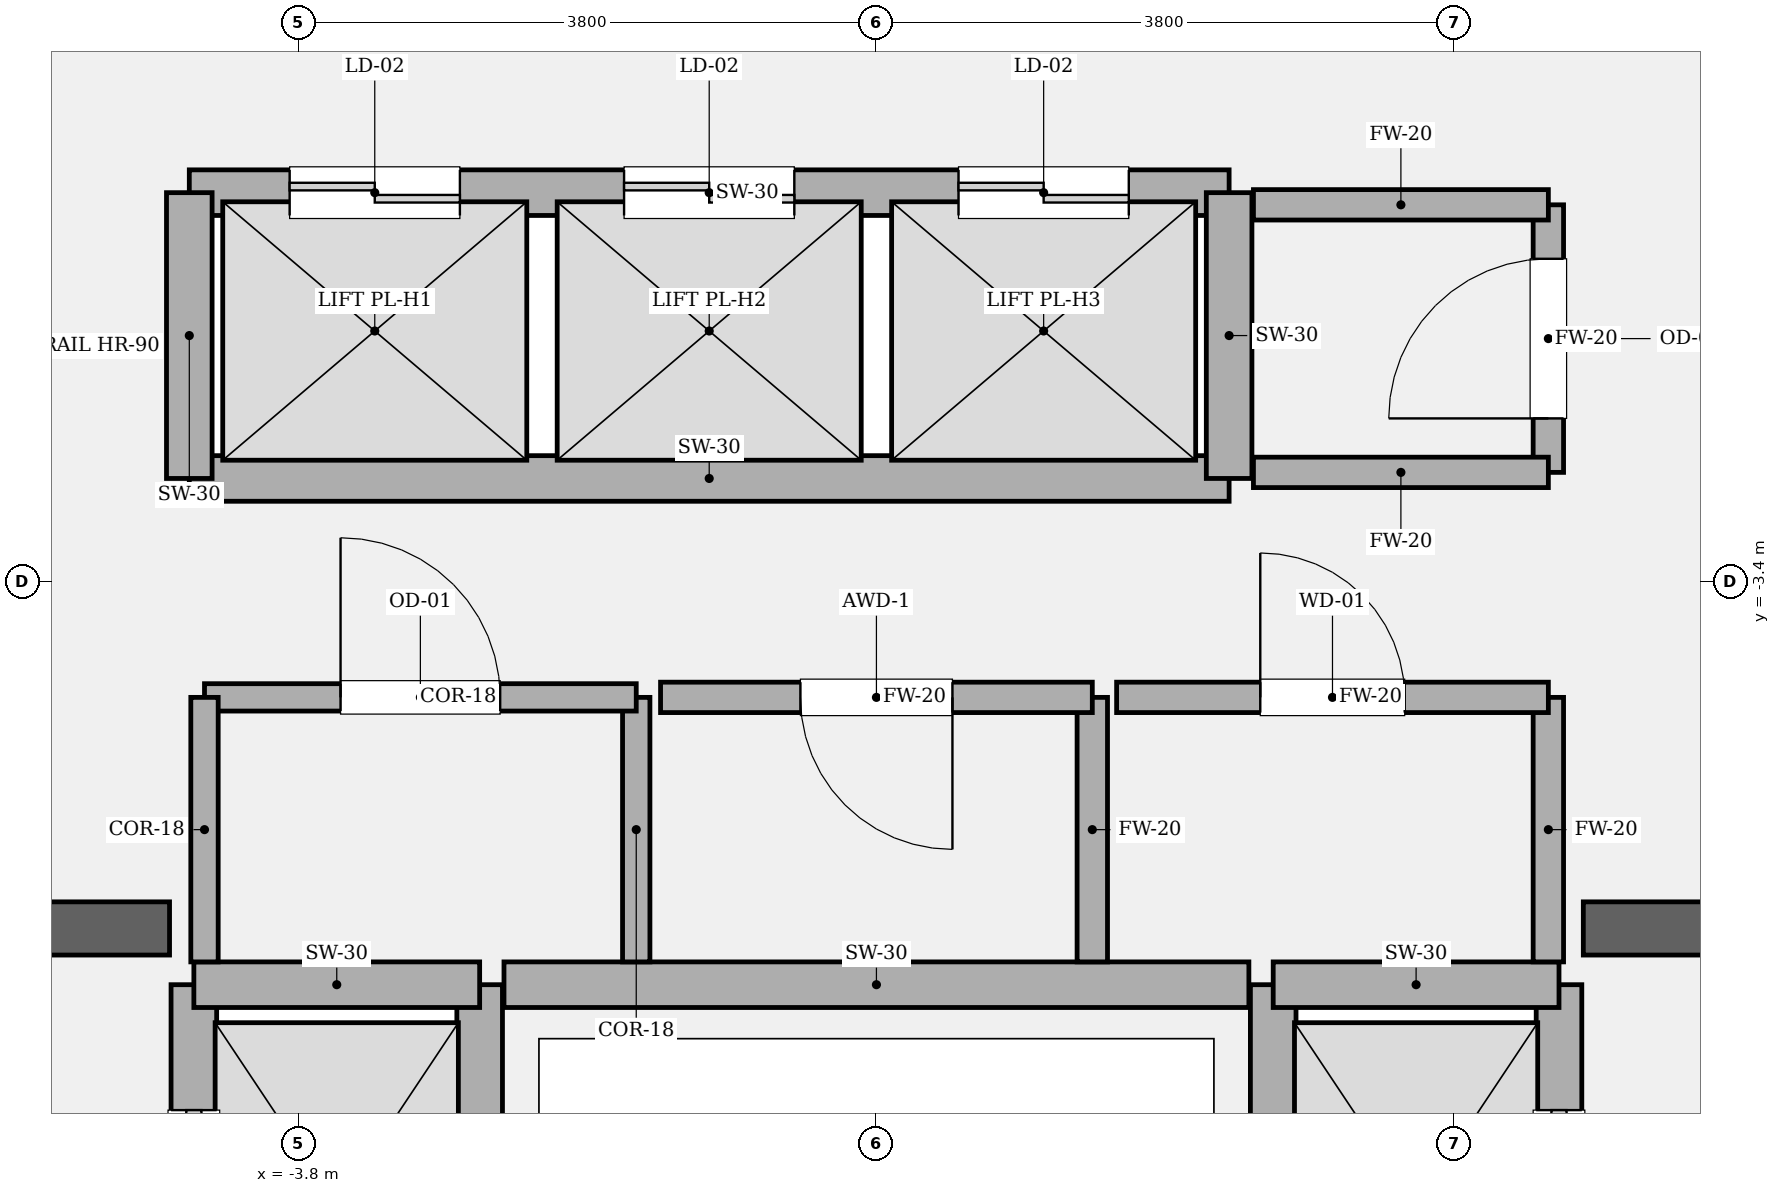
"""IFC4 building model, lengths in metres.
Left out: names, types, materials, properties, quantities, classifications, styles, units other than length and angle.
Written with IfcOpenShell. Run it as: python <this file> out.ifc"""

import sys

from ifc_helpers import new_model, si_unit, direction, frame, frame_2d, origin, place, context, subcontext, project, spatial, rectangle, extrude, element, fill, save


model = new_model("IFC4")
c1 = context("Model", 3, precision=1e-05, world=origin(), true_north=direction((0.0, 1.0)))
c2 = subcontext(c1, "Body", "Model", "MODEL_VIEW")
j1 = project(units=[si_unit("LENGTHUNIT", "METRE"), si_unit("PLANEANGLEUNIT", "RADIAN")], contexts=[c1])
p1 = place(None, origin())
s1 = spatial("IfcSite", under=j1, at=p1, CompositionType="ELEMENT")
p2 = place(p1, origin())
s2 = spatial("IfcBuilding", under=s1, at=p2, CompositionType="ELEMENT")
p3 = place(p2, frame((0.0, 0.0, 251.4)))
s3 = spatial("IfcBuildingStorey", under=s2, at=p3, CompositionType="ELEMENT", Elevation=251.4)
p4 = place(p3, frame((-9.925, -5.68, 0.0), z_axis=(0.0, 0.0, 1.0), x_axis=(1.0, 0.0, 0.0)))
e1 = element("IfcWall", 1, at=p4, inside=s3, PredefinedType="SOLIDWALL", context=c2, shape_type="SweptSolid", body=[
    extrude(rectangle(XDim=5.275, YDim=0.35, at=frame_2d((2.638, 0.0))), origin(), (0.0, 0.0, 1.0), 4.05),
])
p5 = place(p4, frame((1.385, 0.0, 0.0)))
e2 = element("IfcOpeningElement", 2, at=p5, cuts=e1, PredefinedType="OPENING", context=c2, shape_type="SweptSolid", body=[
    extrude(rectangle(XDim=1.18, YDim=2.2, at=frame_2d((0.59, 1.1))), frame((0.0, 0.185, 0.0), z_axis=(0.0, -1.0, 0.0), x_axis=(1.0, 0.0, 0.0)), (0.0, 0.0, 1.0), 0.37),
])
p6 = place(p3, frame((4.65, -5.68, 0.0), z_axis=(0.0, 0.0, 1.0), x_axis=(1.0, 0.0, 0.0)))
e3 = element("IfcWall", 3, at=p6, inside=s3, PredefinedType="SOLIDWALL", context=c2, shape_type="SweptSolid", body=[
    extrude(rectangle(XDim=5.275, YDim=0.35, at=frame_2d((2.638, 0.0))), origin(), (0.0, 0.0, 1.0), 4.05),
])
p7 = place(p6, frame((2.71, 0.0, 0.0)))
e4 = element("IfcOpeningElement", 4, at=p7, cuts=e3, PredefinedType="OPENING", context=c2, shape_type="SweptSolid", body=[
    extrude(rectangle(XDim=1.18, YDim=2.2, at=frame_2d((0.59, 1.1))), frame((0.0, 0.185, 0.0), z_axis=(0.0, -1.0, 0.0), x_axis=(1.0, 0.0, 0.0)), (0.0, 0.0, 1.0), 0.37),
])
p8 = place(p3, frame((-4.49, -8.82, 0.0), z_axis=(0.0, 0.0, 1.0), x_axis=(0.0, 1.0, 0.0)))
e5 = element("IfcWall", 5, at=p8, inside=s3, PredefinedType="SOLIDWALL", context=c2, shape_type="SweptSolid", body=[
    extrude(rectangle(XDim=2.77, YDim=0.3, at=frame_2d((1.385, 0.0))), origin(), (0.0, 0.0, 1.0), 3.85),
])
p9 = place(p8, frame((0.825, 0.0, 0.0)))
e6 = element("IfcOpeningElement", 6, at=p9, cuts=e5, PredefinedType="OPENING", context=c2, shape_type="SweptSolid", body=[
    extrude(rectangle(XDim=1.12, YDim=2.25, at=frame_2d((0.56, 1.125))), frame((0.0, 0.16, 0.0), z_axis=(0.0, -1.0, 0.0), x_axis=(1.0, 0.0, 0.0)), (0.0, 0.0, 1.0), 0.32),
])
p10 = place(p3, frame((-2.61, -8.82, 0.0), z_axis=(0.0, 0.0, 1.0), x_axis=(0.0, 1.0, 0.0)))
e7 = element("IfcWall", 7, at=p10, inside=s3, PredefinedType="SOLIDWALL", context=c2, shape_type="SweptSolid", body=[
    extrude(rectangle(XDim=2.77, YDim=0.3, at=frame_2d((1.385, 0.0))), origin(), (0.0, 0.0, 1.0), 3.85),
])
p11 = place(p3, frame((-4.49, -6.05, 0.0), z_axis=(0.0, 0.0, 1.0), x_axis=(1.0, 0.0, 0.0)))
e8 = element("IfcWall", 8, at=p11, inside=s3, PredefinedType="SOLIDWALL", context=c2, shape_type="SweptSolid", body=[
    extrude(rectangle(XDim=1.88, YDim=0.3, at=frame_2d((0.94, 0.0))), origin(), (0.0, 0.0, 1.0), 3.85),
])
p12 = place(p3, frame((4.49, -8.82, 0.0), z_axis=(0.0, 0.0, 1.0), x_axis=(0.0, 1.0, 0.0)))
e9 = element("IfcWall", 9, at=p12, inside=s3, PredefinedType="SOLIDWALL", context=c2, shape_type="SweptSolid", body=[
    extrude(rectangle(XDim=2.77, YDim=0.3, at=frame_2d((1.385, 0.0))), origin(), (0.0, 0.0, 1.0), 3.85),
])
p13 = place(p12, frame((0.825, 0.0, 0.0)))
e10 = element("IfcOpeningElement", 10, at=p13, cuts=e9, PredefinedType="OPENING", context=c2, shape_type="SweptSolid", body=[
    extrude(rectangle(XDim=1.12, YDim=2.25, at=frame_2d((0.56, 1.125))), frame((0.0, 0.16, 0.0), z_axis=(0.0, -1.0, 0.0), x_axis=(1.0, 0.0, 0.0)), (0.0, 0.0, 1.0), 0.32),
])
p14 = place(p3, frame((2.61, -8.82, 0.0), z_axis=(0.0, 0.0, 1.0), x_axis=(0.0, 1.0, 0.0)))
e11 = element("IfcWall", 11, at=p14, inside=s3, PredefinedType="SOLIDWALL", context=c2, shape_type="SweptSolid", body=[
    extrude(rectangle(XDim=2.77, YDim=0.3, at=frame_2d((1.385, 0.0))), origin(), (0.0, 0.0, 1.0), 3.85),
])
p15 = place(p3, frame((2.61, -6.05, 0.0), z_axis=(0.0, 0.0, 1.0), x_axis=(1.0, 0.0, 0.0)))
e12 = element("IfcWall", 12, at=p15, inside=s3, PredefinedType="SOLIDWALL", context=c2, shape_type="SweptSolid", body=[
    extrude(rectangle(XDim=1.88, YDim=0.3, at=frame_2d((0.94, 0.0))), origin(), (0.0, 0.0, 1.0), 3.85),
])
p16 = place(p3, frame((-4.52, -0.84, 0.0), z_axis=(0.0, 0.0, 1.0), x_axis=(1.0, 0.0, 0.0)))
e13 = element("IfcWall", 13, at=p16, inside=s3, PredefinedType="SOLIDWALL", context=c2, shape_type="SweptSolid", body=[
    extrude(rectangle(XDim=6.84, YDim=0.3, at=frame_2d((3.42, 0.0))), origin(), (0.0, 0.0, 1.0), 3.85),
])
p17 = place(p16, frame((0.66, 0.0, 0.0)))
e14 = element("IfcOpeningElement", 14, at=p17, cuts=e13, PredefinedType="OPENING", context=c2, shape_type="SweptSolid", body=[
    extrude(rectangle(XDim=1.12, YDim=2.25, at=frame_2d((0.56, 1.125))), frame((0.0, 0.16, 0.0), z_axis=(0.0, -1.0, 0.0), x_axis=(1.0, 0.0, 0.0)), (0.0, 0.0, 1.0), 0.32),
])
p18 = place(p16, frame((2.86, 0.0, 0.0)))
e15 = element("IfcOpeningElement", 15, at=p18, cuts=e13, PredefinedType="OPENING", context=c2, shape_type="SweptSolid", body=[
    extrude(rectangle(XDim=1.12, YDim=2.25, at=frame_2d((0.56, 1.125))), frame((0.0, 0.16, 0.0), z_axis=(0.0, -1.0, 0.0), x_axis=(1.0, 0.0, 0.0)), (0.0, 0.0, 1.0), 0.32),
])
p19 = place(p16, frame((5.06, 0.0, 0.0)))
e16 = element("IfcOpeningElement", 16, at=p19, cuts=e13, PredefinedType="OPENING", context=c2, shape_type="SweptSolid", body=[
    extrude(rectangle(XDim=1.12, YDim=2.25, at=frame_2d((0.56, 1.125))), frame((0.0, 0.16, 0.0), z_axis=(0.0, -1.0, 0.0), x_axis=(1.0, 0.0, 0.0)), (0.0, 0.0, 1.0), 0.32),
])
p20 = place(p3, frame((-4.52, -2.72, 0.0), z_axis=(0.0, 0.0, 1.0), x_axis=(1.0, 0.0, 0.0)))
e17 = element("IfcWall", 17, at=p20, inside=s3, PredefinedType="SOLIDWALL", context=c2, shape_type="SweptSolid", body=[
    extrude(rectangle(XDim=6.84, YDim=0.3, at=frame_2d((3.42, 0.0))), origin(), (0.0, 0.0, 1.0), 3.85),
])
for number, where, z_axis, x_axis in (
    (18, (-4.52, -2.72, 0.0), (0.0, 0.0, 1.0), (0.0, 1.0, 0.0)),
    (19, (2.32, -2.72, 0.0), (0.0, 0.0, 1.0), (0.0, 1.0, 0.0)),
):
    element("IfcWall", number, at=place(p3, frame(where, z_axis=z_axis, x_axis=x_axis)), inside=s3, PredefinedType="SOLIDWALL", context=c2, shape_type="SweptSolid", body=[
        extrude(rectangle(XDim=1.88, YDim=0.3, at=frame_2d((0.94, 0.0))), origin(), (0.0, 0.0, 1.0), 3.85),
    ])
p21 = place(p3, frame((-2.45, -6.05, 0.0), z_axis=(0.0, 0.0, 1.0), x_axis=(1.0, 0.0, 0.0)))
e20 = element("IfcWall", 20, at=p21, inside=s3, PredefinedType="SOLIDWALL", context=c2, shape_type="SweptSolid", body=[
    extrude(rectangle(XDim=4.9, YDim=0.3, at=frame_2d((2.45, 0.0))), origin(), (0.0, 0.0, 1.0), 3.85),
])
p22 = place(p3, frame((-1.58, -5.9, 0.0), z_axis=(0.0, 0.0, 1.0), x_axis=(0.0, 1.0, 0.0)))
e21 = element("IfcWall", 21, at=p22, inside=s3, PredefinedType="PARTITIONING", context=c2, shape_type="SweptSolid", body=[
    extrude(rectangle(XDim=1.74, YDim=0.18, at=frame_2d((0.87, 0.0))), origin(), (0.0, 0.0, 1.0), 3.85),
])
p23 = place(p3, frame((-1.58, -4.16, 0.0), z_axis=(0.0, 0.0, 1.0), x_axis=(-1.0, 0.0, 0.0)))
e22 = element("IfcWall", 22, at=p23, inside=s3, PredefinedType="PARTITIONING", context=c2, shape_type="SweptSolid", body=[
    extrude(rectangle(XDim=2.84, YDim=0.18, at=frame_2d((1.42, 0.0))), origin(), (0.0, 0.0, 1.0), 3.85),
])
p24 = place(p23, frame((0.895, 0.0, 0.0)))
e23 = element("IfcOpeningElement", 23, at=p24, cuts=e22, PredefinedType="OPENING", context=c2, shape_type="SweptSolid", body=[
    extrude(rectangle(XDim=1.05, YDim=2.2, at=frame_2d((0.525, 1.1))), frame((0.0, 0.1, 0.0), z_axis=(0.0, -1.0, 0.0), x_axis=(1.0, 0.0, 0.0)), (0.0, 0.0, 1.0), 0.2),
])
p25 = place(p3, frame((-4.42, -4.16, 0.0), z_axis=(0.0, 0.0, 1.0), x_axis=(0.0, -1.0, 0.0)))
e24 = element("IfcWall", 24, at=p25, inside=s3, PredefinedType="PARTITIONING", context=c2, shape_type="SweptSolid", body=[
    extrude(rectangle(XDim=1.74, YDim=0.18, at=frame_2d((0.87, 0.0))), origin(), (0.0, 0.0, 1.0), 3.85),
])
p26 = place(p3, frame((1.42, -5.9, 0.0), z_axis=(0.0, 0.0, 1.0), x_axis=(0.0, 1.0, 0.0)))
e25 = element("IfcWall", 25, at=p26, inside=s3, PredefinedType="SOLIDWALL", context=c2, shape_type="SweptSolid", body=[
    extrude(rectangle(XDim=1.74, YDim=0.2, at=frame_2d((0.87, 0.0))), origin(), (0.0, 0.0, 1.0), 3.85),
])
p27 = place(p3, frame((1.42, -4.16, 0.0), z_axis=(0.0, 0.0, 1.0), x_axis=(-1.0, 0.0, 0.0)))
e26 = element("IfcWall", 26, at=p27, inside=s3, PredefinedType="SOLIDWALL", context=c2, shape_type="SweptSolid", body=[
    extrude(rectangle(XDim=2.84, YDim=0.2, at=frame_2d((1.42, 0.0))), origin(), (0.0, 0.0, 1.0), 3.85),
])
p28 = place(p27, frame((0.92, 0.0, 0.0)))
e27 = element("IfcOpeningElement", 27, at=p28, cuts=e26, PredefinedType="OPENING", context=c2, shape_type="SweptSolid", body=[
    extrude(rectangle(XDim=1.0, YDim=2.15, at=frame_2d((0.5, 1.075))), frame((0.0, 0.11, 0.0), z_axis=(0.0, -1.0, 0.0), x_axis=(1.0, 0.0, 0.0)), (0.0, 0.0, 1.0), 0.22),
])
p29 = place(p3, frame((4.42, -5.9, 0.0), z_axis=(0.0, 0.0, 1.0), x_axis=(0.0, 1.0, 0.0)))
e28 = element("IfcWall", 28, at=p29, inside=s3, PredefinedType="SOLIDWALL", context=c2, shape_type="SweptSolid", body=[
    extrude(rectangle(XDim=1.74, YDim=0.2, at=frame_2d((0.87, 0.0))), origin(), (0.0, 0.0, 1.0), 3.85),
])
p30 = place(p3, frame((4.42, -4.16, 0.0), z_axis=(0.0, 0.0, 1.0), x_axis=(-1.0, 0.0, 0.0)))
e29 = element("IfcWall", 29, at=p30, inside=s3, PredefinedType="SOLIDWALL", context=c2, shape_type="SweptSolid", body=[
    extrude(rectangle(XDim=2.84, YDim=0.2, at=frame_2d((1.42, 0.0))), origin(), (0.0, 0.0, 1.0), 3.85),
])
p31 = place(p30, frame((0.945, 0.0, 0.0)))
e30 = element("IfcOpeningElement", 30, at=p31, cuts=e29, PredefinedType="OPENING", context=c2, shape_type="SweptSolid", body=[
    extrude(rectangle(XDim=0.95, YDim=2.15, at=frame_2d((0.475, 1.075))), frame((0.0, 0.11, 0.0), z_axis=(0.0, -1.0, 0.0), x_axis=(1.0, 0.0, 0.0)), (0.0, 0.0, 1.0), 0.22),
])
p32 = place(p3, frame((4.42, -2.68, 0.0), z_axis=(0.0, 0.0, 1.0), x_axis=(0.0, 1.0, 0.0)))
e31 = element("IfcWall", 31, at=p32, inside=s3, PredefinedType="SOLIDWALL", context=c2, shape_type="SweptSolid", body=[
    extrude(rectangle(XDim=1.76, YDim=0.2, at=frame_2d((0.88, 0.0))), origin(), (0.0, 0.0, 1.0), 3.85),
])
p33 = place(p32, frame((0.355, 0.0, 0.0)))
e32 = element("IfcOpeningElement", 32, at=p33, cuts=e31, PredefinedType="OPENING", context=c2, shape_type="SweptSolid", body=[
    extrude(rectangle(XDim=1.05, YDim=2.2, at=frame_2d((0.525, 1.1))), frame((0.0, 0.11, 0.0), z_axis=(0.0, -1.0, 0.0), x_axis=(1.0, 0.0, 0.0)), (0.0, 0.0, 1.0), 0.22),
])
for number, where, z_axis, x_axis in (
    (33, (4.42, -0.92, 0.0), (0.0, 0.0, 1.0), (-1.0, 0.0, 0.0)),
    (34, (2.48, -2.68, 0.0), (0.0, 0.0, 1.0), (1.0, 0.0, 0.0)),
):
    element("IfcWall", number, at=place(p3, frame(where, z_axis=z_axis, x_axis=x_axis)), inside=s3, PredefinedType="SOLIDWALL", context=c2, shape_type="SweptSolid", body=[
        extrude(rectangle(XDim=1.94, YDim=0.2, at=frame_2d((0.97, 0.0))), origin(), (0.0, 0.0, 1.0), 3.85),
    ])
p34 = place(p9, origin())
e35 = element("IfcDoor", 35, at=p34, inside=s3, OperationType="SLIDING_TO_LEFT", PredefinedType="DOOR", context=c2, shape_type="SweptSolid", body=[
    extrude(rectangle(XDim=1.12, YDim=2.25, at=frame_2d((0.56, 1.125))), frame((0.0, 0.025, 0.0), z_axis=(0.0, -1.0, 0.0), x_axis=(1.0, 0.0, 0.0)), (0.0, 0.0, 1.0), 0.05),
])
fill(e6, e35)
p35 = place(p13, origin())
e36 = element("IfcDoor", 36, at=p35, inside=s3, OperationType="SLIDING_TO_RIGHT", PredefinedType="DOOR", context=c2, shape_type="SweptSolid", body=[
    extrude(rectangle(XDim=1.12, YDim=2.25, at=frame_2d((0.56, 1.125))), frame((0.0, 0.025, 0.0), z_axis=(0.0, -1.0, 0.0), x_axis=(1.0, 0.0, 0.0)), (0.0, 0.0, 1.0), 0.05),
])
fill(e10, e36)
p36 = place(p17, origin())
e37 = element("IfcDoor", 37, at=p36, inside=s3, OperationType="DOUBLE_DOOR_SLIDING", PredefinedType="DOOR", context=c2, shape_type="SweptSolid", body=[
    extrude(rectangle(XDim=1.12, YDim=2.25, at=frame_2d((0.56, 1.125))), frame((0.0, 0.025, 0.0), z_axis=(0.0, -1.0, 0.0), x_axis=(1.0, 0.0, 0.0)), (0.0, 0.0, 1.0), 0.05),
])
fill(e14, e37)
p37 = place(p18, origin())
e38 = element("IfcDoor", 38, at=p37, inside=s3, OperationType="DOUBLE_DOOR_SLIDING", PredefinedType="DOOR", context=c2, shape_type="SweptSolid", body=[
    extrude(rectangle(XDim=1.12, YDim=2.25, at=frame_2d((0.56, 1.125))), frame((0.0, 0.025, 0.0), z_axis=(0.0, -1.0, 0.0), x_axis=(1.0, 0.0, 0.0)), (0.0, 0.0, 1.0), 0.05),
])
fill(e15, e38)
p38 = place(p19, origin())
e39 = element("IfcDoor", 39, at=p38, inside=s3, OperationType="DOUBLE_DOOR_SLIDING", PredefinedType="DOOR", context=c2, shape_type="SweptSolid", body=[
    extrude(rectangle(XDim=1.12, YDim=2.25, at=frame_2d((0.56, 1.125))), frame((0.0, 0.025, 0.0), z_axis=(0.0, -1.0, 0.0), x_axis=(1.0, 0.0, 0.0)), (0.0, 0.0, 1.0), 0.05),
])
fill(e16, e39)
p39 = place(p24, origin())
e40 = element("IfcDoor", 40, at=p39, inside=s3, OperationType="SINGLE_SWING_RIGHT", PredefinedType="DOOR", context=c2, shape_type="SweptSolid", body=[
    extrude(rectangle(XDim=1.05, YDim=2.2, at=frame_2d((0.525, 1.1))), frame((0.0, 0.025, 0.0), z_axis=(0.0, -1.0, 0.0), x_axis=(1.0, 0.0, 0.0)), (0.0, 0.0, 1.0), 0.05),
])
fill(e23, e40)
p40 = place(p28, origin())
e41 = element("IfcDoor", 41, at=p40, inside=s3, OperationType="SINGLE_SWING_LEFT", PredefinedType="DOOR", context=c2, shape_type="SweptSolid", body=[
    extrude(rectangle(XDim=1.0, YDim=2.15, at=frame_2d((0.5, 1.075))), frame((0.0, 0.025, 0.0), z_axis=(0.0, -1.0, 0.0), x_axis=(1.0, 0.0, 0.0)), (0.0, 0.0, 1.0), 0.05),
])
fill(e27, e41)
p41 = place(p31, origin())
e42 = element("IfcDoor", 42, at=p41, inside=s3, OperationType="SINGLE_SWING_RIGHT", PredefinedType="DOOR", context=c2, shape_type="SweptSolid", body=[
    extrude(rectangle(XDim=0.95, YDim=2.15, at=frame_2d((0.475, 1.075))), frame((0.0, 0.025, 0.0), z_axis=(0.0, -1.0, 0.0), x_axis=(1.0, 0.0, 0.0)), (0.0, 0.0, 1.0), 0.05),
])
fill(e30, e42)
p42 = place(p33, origin())
e43 = element("IfcDoor", 43, at=p42, inside=s3, OperationType="SINGLE_SWING_LEFT", PredefinedType="DOOR", context=c2, shape_type="SweptSolid", body=[
    extrude(rectangle(XDim=1.05, YDim=2.2, at=frame_2d((0.525, 1.1))), frame((0.0, 0.025, 0.0), z_axis=(0.0, -1.0, 0.0), x_axis=(1.0, 0.0, 0.0)), (0.0, 0.0, 1.0), 0.05),
])
fill(e32, e43)
save(model, sys.argv[1])
